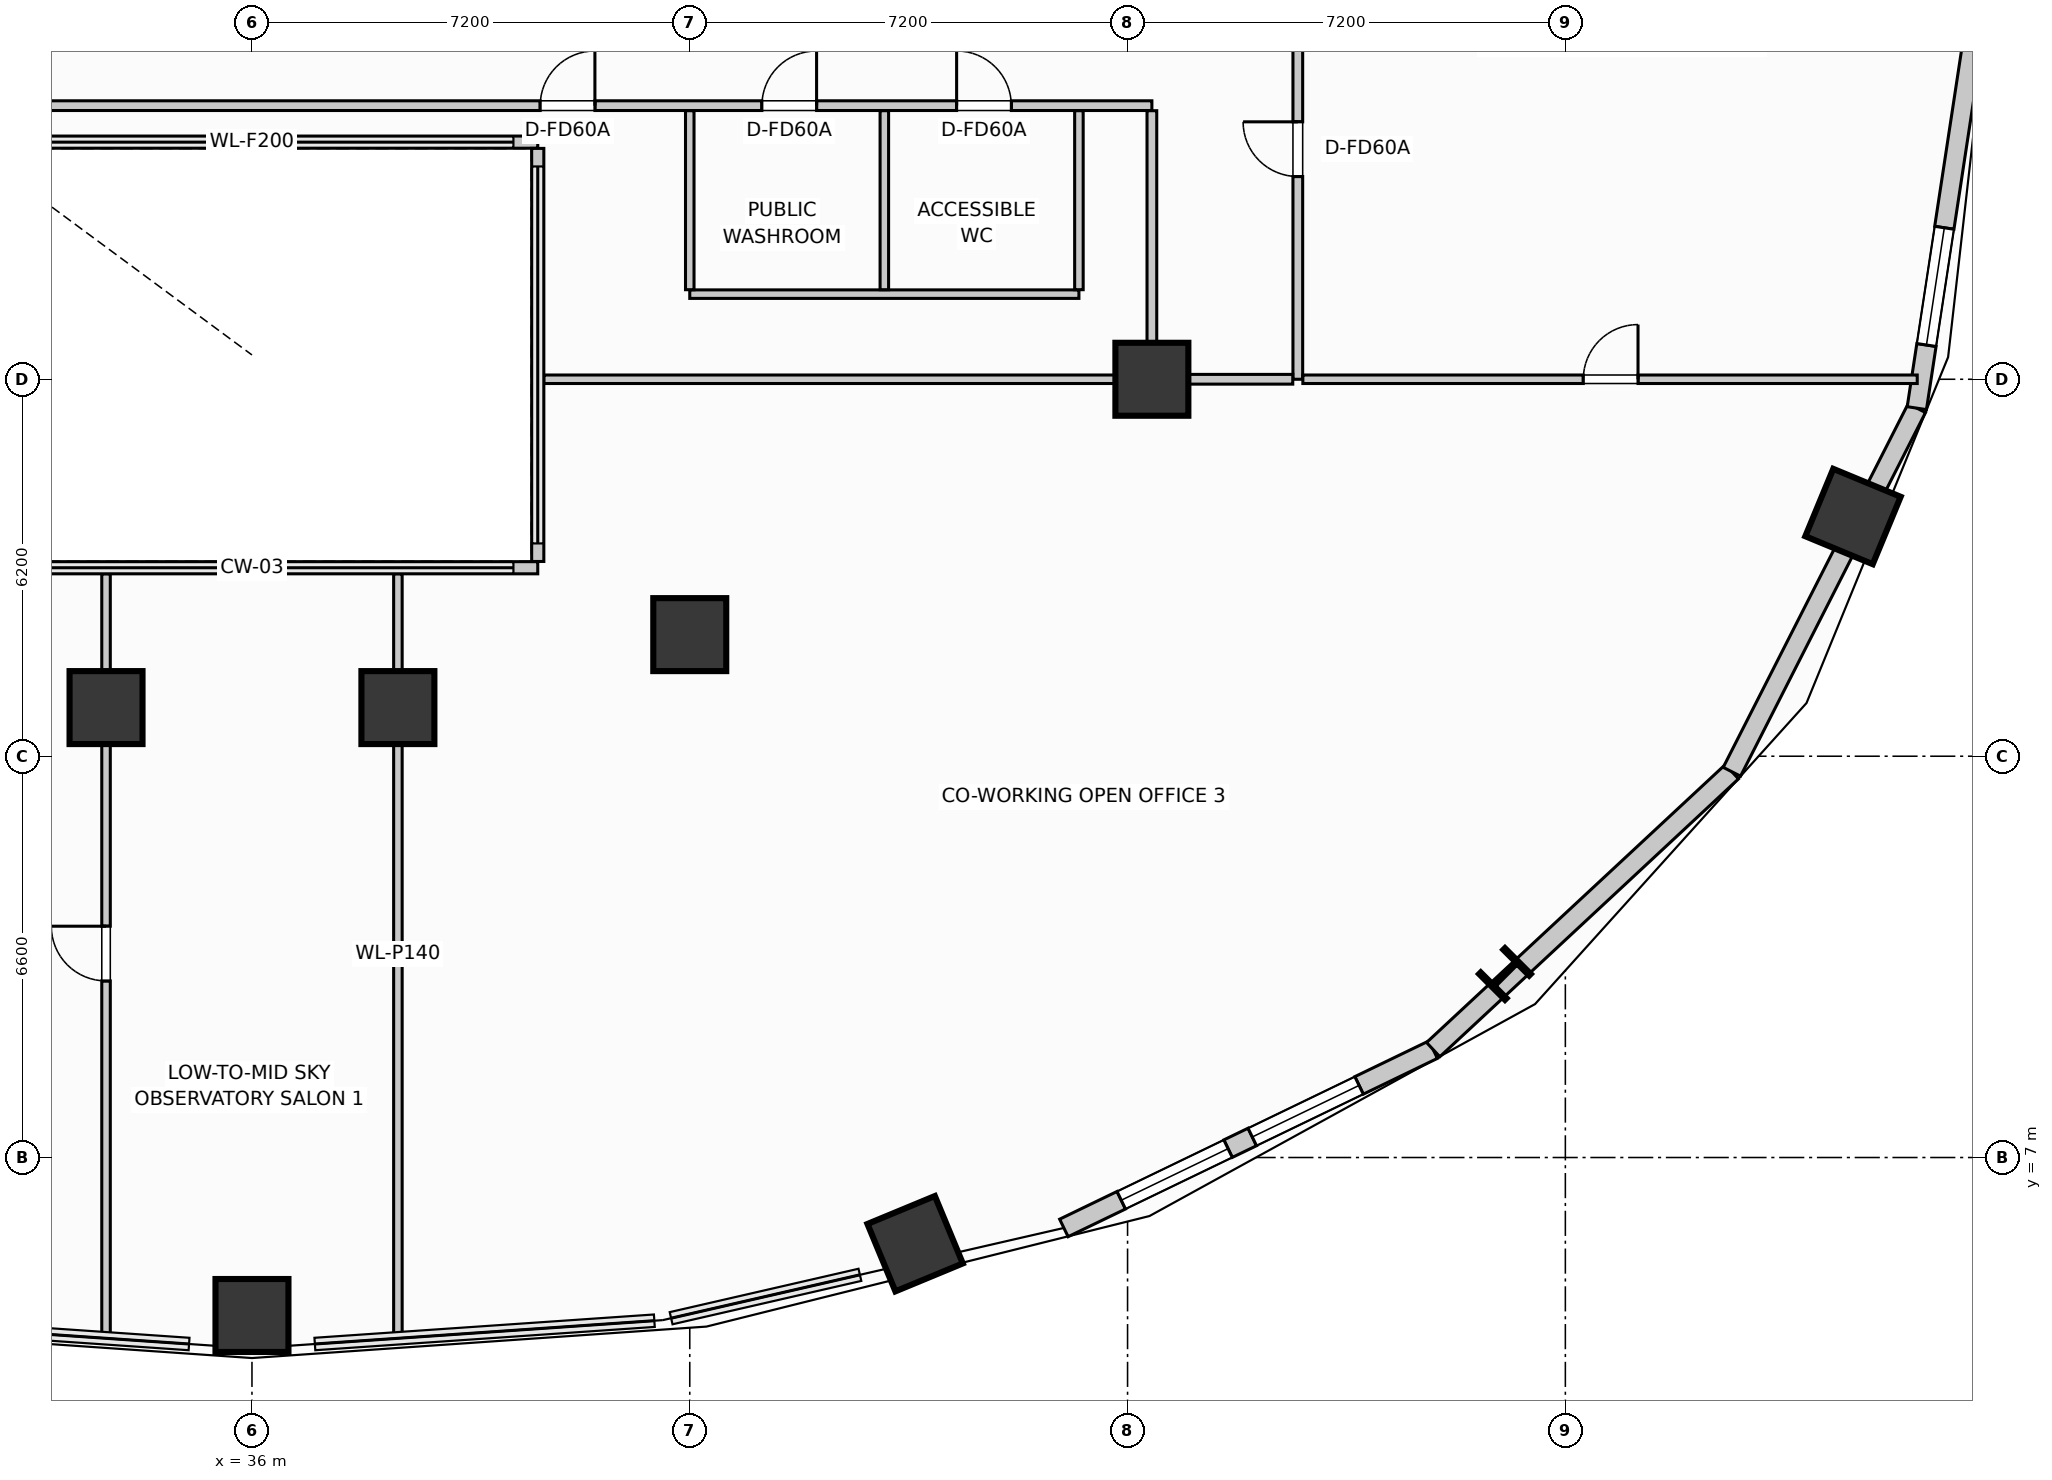
"""IFC4 building model, lengths in metres.
Left out: names, types, materials, properties, quantities, classifications, styles, units other than length and angle.
Written with IfcOpenShell. Run it as: python <this file> out.ifc"""

import sys

from ifc_helpers import new_model, si_unit, direction, frame, frame_2d, origin, origin_2d, place, context, subcontext, project, spatial, rectangle, i_section, extrude, element, fill, save


model = new_model("IFC4")
c1 = context("Model", 3, precision=1e-05, world=origin(), true_north=direction((0.0, 1.0)))
c2 = subcontext(c1, "Body", "Model", "MODEL_VIEW")
j1 = project(units=[si_unit("LENGTHUNIT", "METRE"), si_unit("PLANEANGLEUNIT", "RADIAN")], contexts=[c1])
p1 = place(None, origin())
s1 = spatial("IfcSite", under=j1, at=p1, CompositionType="ELEMENT")
p2 = place(p1, origin())
s2 = spatial("IfcBuilding", under=s1, at=p2, CompositionType="ELEMENT")
p3 = place(p2, frame((0.0, 0.0, 105.95)))
s3 = spatial("IfcBuildingStorey", under=s2, at=p3, CompositionType="ELEMENT", Elevation=105.95)
for number, where, z_axis, x_axis in (
    (1, (50.8, 19.8, 0.0), (0.0, 0.0, 1.0), (1.0, 0.0, 0.0)),
    (2, (43.2, 15.6, 0.0), (0.0, 0.0, 1.0), (1.0, 0.0, 0.0)),
    (3, (38.4, 14.4, 0.0), (0.0, 0.0, 1.0), (1.0, 0.0, 0.0)),
    (4, (33.6, 14.4, 0.0), (0.0, 0.0, 1.0), (1.0, 0.0, 0.0)),
    (5, (36.0, 4.402, 0.0), (0.0, 0.0, 1.0), (0.0, -1.0, 0.0)),
    (6, (46.906, 5.582, 0.0), (0.0, 0.0, 1.0), (0.383, -0.924, 0.0)),
):
    element("IfcColumn", number, at=place(p3, frame(where, z_axis=z_axis, x_axis=x_axis)), inside=s3, PredefinedType="COLUMN", context=c2, shape_type="SweptSolid", body=[
        extrude(rectangle(XDim=1.2, YDim=1.2, at=origin_2d()), origin(), (0.0, 0.0, 1.0), 4.5),
    ])
p4 = place(p3, frame((56.607, 10.018, 0.0), z_axis=(0.0, 0.0, 1.0), x_axis=(0.707106781187, -0.707106781187, 0.0)))
e7 = element("IfcColumn", 7, at=p4, inside=s3, PredefinedType="COLUMN", context=c2, shape_type="SweptSolid", body=[
    extrude(i_section(OverallWidth=0.6, OverallDepth=0.6, WebThickness=0.025, FlangeThickness=0.036, at=origin_2d()), origin(), (0.0, 0.0, 1.0), 4.5),
])
p5 = place(p3, frame((62.331, 17.543, 0.0), z_axis=(0.0, 0.0, 1.0), x_axis=(0.923879532511, -0.382683432365, 0.0)))
e8 = element("IfcColumn", 8, at=p5, inside=s3, PredefinedType="COLUMN", context=c2, shape_type="SweptSolid", body=[
    extrude(rectangle(XDim=1.2, YDim=1.2, at=origin_2d()), origin(), (0.0, 0.0, 1.0), 4.5),
])
p6 = place(p3, frame((49.353, 5.842, 0.0), z_axis=(0.0, 0.0, 1.0), x_axis=(0.900510094661, 0.434835106004, 0.0)))
e9 = element("IfcWall", 9, at=p6, inside=s3, PredefinedType="STANDARD", context=c2, shape_type="SweptSolid", body=[
    extrude(rectangle(XDim=6.745, YDim=0.32, at=frame_2d((3.373, 0.0))), origin(), (0.0, 0.0, 1.0), 4.26),
])
p7 = place(p6, frame((1.048, 0.0, 0.75)))
e10 = element("IfcOpeningElement", 10, at=p7, cuts=e9, PredefinedType="OPENING", context=c2, shape_type="SweptSolid", body=[
    extrude(rectangle(XDim=1.95, YDim=1.68, at=frame_2d((0.975, 0.84))), frame((0.0, 0.17, 0.0), z_axis=(0.0, -1.0, 0.0), x_axis=(1.0, 0.0, 0.0)), (0.0, 0.0, 1.0), 0.34),
])
p8 = place(p6, frame((3.441, 0.0, 0.75)))
e11 = element("IfcOpeningElement", 11, at=p8, cuts=e9, PredefinedType="OPENING", context=c2, shape_type="SweptSolid", body=[
    extrude(rectangle(XDim=1.95, YDim=1.68, at=frame_2d((0.975, 0.84))), frame((0.0, 0.17, 0.0), z_axis=(0.0, -1.0, 0.0), x_axis=(1.0, 0.0, 0.0)), (0.0, 0.0, 1.0), 0.34),
])
p9 = place(p3, frame((55.427, 8.774, 0.0), z_axis=(0.0, 0.0, 1.0), x_axis=(0.732137360086, 0.681157020052, 0.0)))
e12 = element("IfcWall", 12, at=p9, inside=s3, PredefinedType="STANDARD", context=c2, shape_type="SweptSolid", body=[
    extrude(rectangle(XDim=6.709, YDim=0.32, at=frame_2d((3.354, 0.0))), origin(), (0.0, 0.0, 1.0), 3.619),
])
p10 = place(p3, frame((60.339, 13.344, 0.0), z_axis=(0.0, 0.0, 1.0), x_axis=(0.453374078001, 0.89132033826, 0.0)))
e13 = element("IfcWall", 13, at=p10, inside=s3, PredefinedType="STANDARD", context=c2, shape_type="SweptSolid", body=[
    extrude(rectangle(XDim=6.71, YDim=0.32, at=frame_2d((3.355, 0.0))), origin(), (0.0, 0.0, 1.0), 3.619),
])
p11 = place(p3, frame((63.381, 19.325, 0.0), z_axis=(0.0, 0.0, 1.0), x_axis=(0.150633288003, 0.988589708901, 0.0)))
e14 = element("IfcWall", 14, at=p11, inside=s3, PredefinedType="STANDARD", context=c2, shape_type="SweptSolid", body=[
    extrude(rectangle(XDim=6.752, YDim=0.32, at=frame_2d((3.376, 0.0))), origin(), (0.0, 0.0, 1.0), 4.26),
])
p12 = place(p11, frame((1.051, 0.0, 0.75)))
e15 = element("IfcOpeningElement", 15, at=p12, cuts=e14, PredefinedType="OPENING", context=c2, shape_type="SweptSolid", body=[
    extrude(rectangle(XDim=1.95, YDim=1.68, at=frame_2d((0.975, 0.84))), frame((0.0, 0.17, 0.0), z_axis=(0.0, -1.0, 0.0), x_axis=(1.0, 0.0, 0.0)), (0.0, 0.0, 1.0), 0.34),
])
for number, where, z_axis, x_axis in (
    (16, (31.3, 23.7, 0.0), (0.0, 0.0, 1.0), (1.0, 0.0, 0.0)),
    (17, (40.7, 16.7, 0.0), (0.0, 0.0, 1.0), (-1.0, 0.0, 0.0)),
):
    element("IfcWall", number, at=place(p3, frame(where, z_axis=z_axis, x_axis=x_axis)), inside=s3, PredefinedType="PARTITIONING", context=c2, shape_type="SweptSolid", body=[
        extrude(rectangle(XDim=9.4, YDim=0.2, at=frame_2d((4.7, 0.0))), origin(), (0.0, 0.0, 1.0), 4.245),
    ])
p13 = place(p3, frame((40.7, 23.597, 0.0), z_axis=(0.0, 0.0, 1.0), x_axis=(0.0, -1.0, 0.0)))
e18 = element("IfcWall", 18, at=p13, inside=s3, PredefinedType="PARTITIONING", context=c2, shape_type="SweptSolid", body=[
    extrude(rectangle(XDim=6.794, YDim=0.2, at=frame_2d((3.397, 0.0))), origin(), (0.0, 0.0, 1.0), 4.245),
])
p14 = place(p3, frame((21.2, 24.3, 0.0), z_axis=(0.0, 0.0, 1.0), x_axis=(1.0, 0.0, 0.0)))
e19 = element("IfcWall", 19, at=p14, inside=s3, PredefinedType="PARTITIONING", context=c2, shape_type="SweptSolid", body=[
    extrude(rectangle(XDim=29.6, YDim=0.16, at=frame_2d((14.8, 0.0))), origin(), (0.0, 0.0, 1.0), 4.245),
])
p15 = place(p14, frame((19.54, 0.0, 0.0)))
e20 = element("IfcOpeningElement", 20, at=p15, cuts=e19, PredefinedType="OPENING", context=c2, shape_type="SweptSolid", body=[
    extrude(rectangle(XDim=0.9, YDim=2.0, at=frame_2d((0.45, 1.0))), frame((0.0, 0.09, 0.0), z_axis=(0.0, -1.0, 0.0), x_axis=(1.0, 0.0, 0.0)), (0.0, 0.0, 1.0), 0.18),
])
p16 = place(p14, frame((26.389, 0.0, 0.0)))
e21 = element("IfcOpeningElement", 21, at=p16, cuts=e19, PredefinedType="OPENING", context=c2, shape_type="SweptSolid", body=[
    extrude(rectangle(XDim=0.9, YDim=2.0, at=frame_2d((0.45, 1.0))), frame((0.0, 0.09, 0.0), z_axis=(0.0, -1.0, 0.0), x_axis=(1.0, 0.0, 0.0)), (0.0, 0.0, 1.0), 0.18),
])
p17 = place(p14, frame((23.186, 0.0, 0.0)))
e22 = element("IfcOpeningElement", 22, at=p17, cuts=e19, PredefinedType="OPENING", context=c2, shape_type="SweptSolid", body=[
    extrude(rectangle(XDim=0.9, YDim=2.0, at=frame_2d((0.45, 1.0))), frame((0.0, 0.09, 0.0), z_axis=(0.0, -1.0, 0.0), x_axis=(1.0, 0.0, 0.0)), (0.0, 0.0, 1.0), 0.18),
])
p18 = place(p3, frame((43.2, 21.2, 0.0), z_axis=(0.0, 0.0, 1.0), x_axis=(1.0, 0.0, 0.0)))
e23 = element("IfcWall", 23, at=p18, inside=s3, PredefinedType="PARTITIONING", context=c2, shape_type="SweptSolid", body=[
    extrude(rectangle(XDim=6.4, YDim=0.14, at=frame_2d((3.2, 0.0))), origin(), (0.0, 0.0, 1.0), 4.245),
])
for number, where, z_axis, x_axis in (
    (24, (46.4, 21.273, 0.0), (0.0, 0.0, 1.0), (0.0, 1.0, 0.0)),
    (25, (43.2, 21.273, 0.0), (0.0, 0.0, 1.0), (0.0, 1.0, 0.0)),
    (26, (49.6, 21.273, 0.0), (0.0, 0.0, 1.0), (0.0, 1.0, 0.0)),
):
    element("IfcWall", number, at=place(p3, frame(where, z_axis=z_axis, x_axis=x_axis)), inside=s3, PredefinedType="PARTITIONING", context=c2, shape_type="SweptSolid", body=[
        extrude(rectangle(XDim=2.944, YDim=0.14, at=frame_2d((1.472, 0.0))), origin(), (0.0, 0.0, 1.0), 4.245),
    ])
p19 = place(p3, frame((53.2, 19.8, 0.0), z_axis=(0.0, 0.0, 1.0), x_axis=(0.0, 1.0, 0.0)))
e27 = element("IfcWall", 27, at=p19, inside=s3, PredefinedType="PARTITIONING", context=c2, shape_type="SweptSolid", body=[
    extrude(rectangle(XDim=15.75, YDim=0.16, at=frame_2d((7.875, 0.0))), origin(), (0.0, 0.0, 1.0), 4.245),
])
p20 = place(p19, frame((3.334, 0.0, 0.0)))
e28 = element("IfcOpeningElement", 28, at=p20, cuts=e27, PredefinedType="OPENING", context=c2, shape_type="SweptSolid", body=[
    extrude(rectangle(XDim=0.9, YDim=2.0, at=frame_2d((0.45, 1.0))), frame((0.0, 0.09, 0.0), z_axis=(0.0, -1.0, 0.0), x_axis=(1.0, 0.0, 0.0)), (0.0, 0.0, 1.0), 0.18),
])
p21 = place(p19, frame((12.527, 0.0, 0.0)))
e29 = element("IfcOpeningElement", 29, at=p21, cuts=e27, PredefinedType="OPENING", context=c2, shape_type="SweptSolid", body=[
    extrude(rectangle(XDim=0.9, YDim=2.0, at=frame_2d((0.45, 1.0))), frame((0.0, 0.09, 0.0), z_axis=(0.0, -1.0, 0.0), x_axis=(1.0, 0.0, 0.0)), (0.0, 0.0, 1.0), 0.18),
])
p22 = place(p3, frame((50.68, 19.8, 0.0), z_axis=(0.0, 0.0, 1.0), x_axis=(1.0, 0.0, 0.0)))
e30 = element("IfcWall", 30, at=p22, inside=s3, PredefinedType="PARTITIONING", context=c2, shape_type="SweptSolid", body=[
    extrude(rectangle(XDim=2.437, YDim=0.16, at=frame_2d((1.219, 0.0))), origin(), (0.0, 0.0, 1.0), 3.618),
])
p23 = place(p3, frame((50.8, 19.883, 0.0), z_axis=(0.0, 0.0, 1.0), x_axis=(0.0, 1.0, 0.0)))
e31 = element("IfcWall", 31, at=p23, inside=s3, PredefinedType="PARTITIONING", context=c2, shape_type="SweptSolid", body=[
    extrude(rectangle(XDim=4.334, YDim=0.16, at=frame_2d((2.167, 0.0))), origin(), (0.0, 0.0, 1.0), 4.245),
])
p24 = place(p3, frame((33.6, 4.092, 0.0), z_axis=(0.0, 0.0, 1.0), x_axis=(0.0, 1.0, 0.0)))
e32 = element("IfcWall", 32, at=p24, inside=s3, PredefinedType="PARTITIONING", context=c2, shape_type="SweptSolid", body=[
    extrude(rectangle(XDim=12.505, YDim=0.14, at=frame_2d((6.253, 0.0))), origin(), (0.0, 0.0, 1.0), 3.618),
])
p25 = place(p24, frame((5.813, 0.0, 0.0)))
e33 = element("IfcOpeningElement", 33, at=p25, cuts=e32, PredefinedType="OPENING", context=c2, shape_type="SweptSolid", body=[
    extrude(rectangle(XDim=0.9, YDim=2.0, at=frame_2d((0.45, 1.0))), frame((0.0, 0.08, 0.0), z_axis=(0.0, -1.0, 0.0), x_axis=(1.0, 0.0, 0.0)), (0.0, 0.0, 1.0), 0.16),
])
p26 = place(p3, frame((38.4, 4.092, 0.0), z_axis=(0.0, 0.0, 1.0), x_axis=(0.0, 1.0, 0.0)))
e34 = element("IfcWall", 34, at=p26, inside=s3, PredefinedType="PARTITIONING", context=c2, shape_type="SweptSolid", body=[
    extrude(rectangle(XDim=12.505, YDim=0.14, at=frame_2d((6.253, 0.0))), origin(), (0.0, 0.0, 1.0), 4.245),
])
p27 = place(p3, frame((40.803, 19.8, 0.0), z_axis=(0.0, 0.0, 1.0), x_axis=(1.0, 0.0, 0.0)))
e35 = element("IfcWall", 35, at=p27, inside=s3, PredefinedType="PARTITIONING", context=c2, shape_type="SweptSolid", body=[
    extrude(rectangle(XDim=9.877, YDim=0.14, at=frame_2d((4.938, 0.0))), origin(), (0.0, 0.0, 1.0), 4.245),
])
p28 = place(p3, frame((53.283, 19.8, 0.0), z_axis=(0.0, 0.0, 1.0), x_axis=(1.0, 0.0, 0.0)))
e36 = element("IfcWall", 36, at=p28, inside=s3, PredefinedType="PARTITIONING", context=c2, shape_type="SweptSolid", body=[
    extrude(rectangle(XDim=10.104, YDim=0.14, at=frame_2d((5.052, 0.0))), origin(), (0.0, 0.0, 1.0), 3.618),
])
p29 = place(p28, frame((4.612, 0.0, 0.0)))
e37 = element("IfcOpeningElement", 37, at=p29, cuts=e36, PredefinedType="OPENING", context=c2, shape_type="SweptSolid", body=[
    extrude(rectangle(XDim=0.9, YDim=2.0, at=frame_2d((0.45, 1.0))), frame((0.0, 0.08, 0.0), z_axis=(0.0, -1.0, 0.0), x_axis=(1.0, 0.0, 0.0)), (0.0, 0.0, 1.0), 0.16),
])
p30 = place(p7, origin())
e38 = element("IfcWindow", 38, at=p30, inside=s3, PartitioningType="SINGLE_PANEL", PredefinedType="WINDOW", context=c2, shape_type="SweptSolid", body=[
    extrude(rectangle(XDim=1.95, YDim=1.68, at=frame_2d((0.975, 0.84))), frame((0.0, 0.03, 0.0), z_axis=(0.0, -1.0, 0.0), x_axis=(1.0, 0.0, 0.0)), (0.0, 0.0, 1.0), 0.06),
])
fill(e10, e38)
p31 = place(p8, origin())
e39 = element("IfcWindow", 39, at=p31, inside=s3, PartitioningType="SINGLE_PANEL", PredefinedType="WINDOW", context=c2, shape_type="SweptSolid", body=[
    extrude(rectangle(XDim=1.95, YDim=1.68, at=frame_2d((0.975, 0.84))), frame((0.0, 0.03, 0.0), z_axis=(0.0, -1.0, 0.0), x_axis=(1.0, 0.0, 0.0)), (0.0, 0.0, 1.0), 0.06),
])
fill(e11, e39)
p32 = place(p12, origin())
e40 = element("IfcWindow", 40, at=p32, inside=s3, PartitioningType="SINGLE_PANEL", PredefinedType="WINDOW", context=c2, shape_type="SweptSolid", body=[
    extrude(rectangle(XDim=1.95, YDim=1.68, at=frame_2d((0.975, 0.84))), frame((0.0, 0.03, 0.0), z_axis=(0.0, -1.0, 0.0), x_axis=(1.0, 0.0, 0.0)), (0.0, 0.0, 1.0), 0.06),
])
fill(e15, e40)
p33 = place(p15, origin())
e41 = element("IfcDoor", 41, at=p33, inside=s3, OperationType="SINGLE_SWING_RIGHT", PredefinedType="DOOR", context=c2, shape_type="SweptSolid", body=[
    extrude(rectangle(XDim=0.9, YDim=2.0, at=frame_2d((0.45, 1.0))), frame((0.0, 0.025, 0.0), z_axis=(0.0, -1.0, 0.0), x_axis=(1.0, 0.0, 0.0)), (0.0, 0.0, 1.0), 0.05),
])
fill(e20, e41)
p34 = place(p20, origin())
e42 = element("IfcDoor", 42, at=p34, inside=s3, OperationType="SINGLE_SWING_RIGHT", PredefinedType="DOOR", context=c2, shape_type="SweptSolid", body=[
    extrude(rectangle(XDim=0.9, YDim=2.0, at=frame_2d((0.45, 1.0))), frame((0.0, 0.025, 0.0), z_axis=(0.0, -1.0, 0.0), x_axis=(1.0, 0.0, 0.0)), (0.0, 0.0, 1.0), 0.05),
])
fill(e28, e42)
p35 = place(p16, origin())
e43 = element("IfcDoor", 43, at=p35, inside=s3, OperationType="SINGLE_SWING_LEFT", PredefinedType="DOOR", context=c2, shape_type="SweptSolid", body=[
    extrude(rectangle(XDim=0.9, YDim=2.0, at=frame_2d((0.45, 1.0))), frame((0.0, 0.025, 0.0), z_axis=(0.0, -1.0, 0.0), x_axis=(1.0, 0.0, 0.0)), (0.0, 0.0, 1.0), 0.05),
])
fill(e21, e43)
p36 = place(p17, origin())
e44 = element("IfcDoor", 44, at=p36, inside=s3, OperationType="SINGLE_SWING_RIGHT", PredefinedType="DOOR", context=c2, shape_type="SweptSolid", body=[
    extrude(rectangle(XDim=0.9, YDim=2.0, at=frame_2d((0.45, 1.0))), frame((0.0, 0.025, 0.0), z_axis=(0.0, -1.0, 0.0), x_axis=(1.0, 0.0, 0.0)), (0.0, 0.0, 1.0), 0.05),
])
fill(e22, e44)
p37 = place(p29, origin())
e45 = element("IfcDoor", 45, at=p37, inside=s3, OperationType="SINGLE_SWING_RIGHT", PredefinedType="DOOR", context=c2, shape_type="SweptSolid", body=[
    extrude(rectangle(XDim=0.9, YDim=2.0, at=frame_2d((0.45, 1.0))), frame((0.0, 0.025, 0.0), z_axis=(0.0, -1.0, 0.0), x_axis=(1.0, 0.0, 0.0)), (0.0, 0.0, 1.0), 0.05),
])
fill(e37, e45)
p38 = place(p25, origin())
e46 = element("IfcDoor", 46, at=p38, inside=s3, OperationType="SINGLE_SWING_RIGHT", PredefinedType="DOOR", context=c2, shape_type="SweptSolid", body=[
    extrude(rectangle(XDim=0.9, YDim=2.0, at=frame_2d((0.45, 1.0))), frame((0.0, 0.025, 0.0), z_axis=(0.0, -1.0, 0.0), x_axis=(1.0, 0.0, 0.0)), (0.0, 0.0, 1.0), 0.05),
])
fill(e33, e46)
save(model, sys.argv[1])
